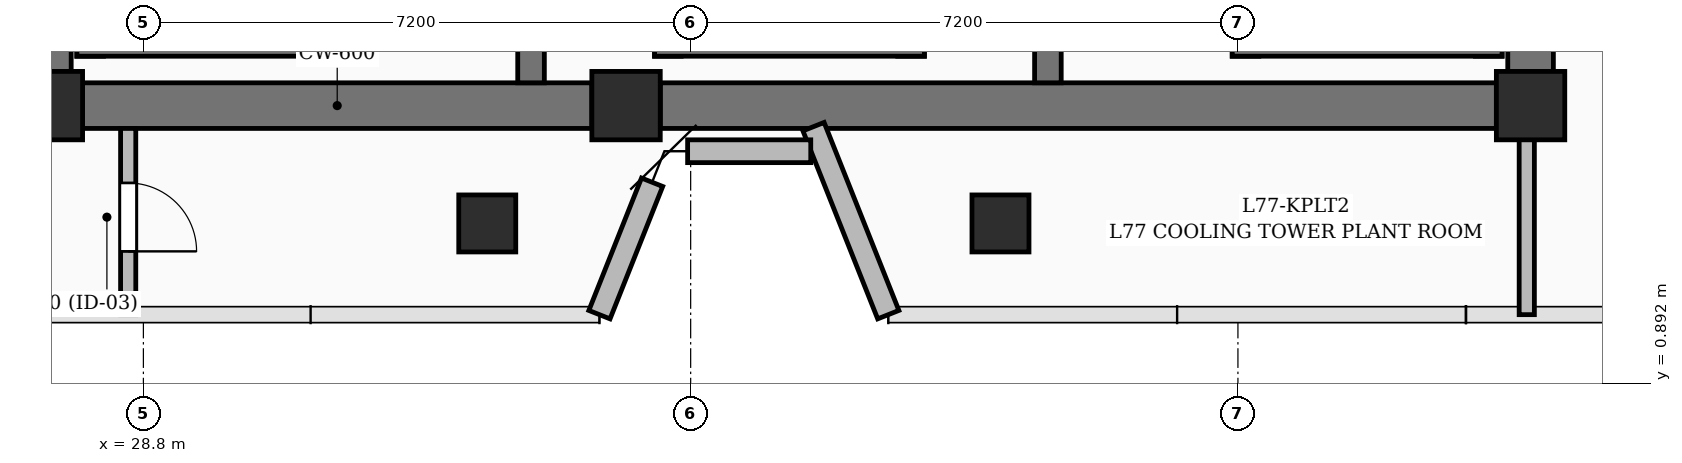
"""IFC4 building model, lengths in metres.
Left out: names, types, materials, properties, quantities, classifications, styles, units other than length and angle.
Written with IfcOpenShell. Run it as: python <this file> out.ifc"""

import sys

from ifc_helpers import new_model, si_unit, direction, frame, frame_2d, origin, origin_2d, place, context, subcontext, project, spatial, rectangle, extrude, element, fill, save


model = new_model("IFC4")
c1 = context("Model", 3, precision=1e-05, world=origin(), true_north=direction((0.0, 1.0)))
c2 = subcontext(c1, "Body", "Model", "MODEL_VIEW")
j1 = project(units=[si_unit("LENGTHUNIT", "METRE"), si_unit("PLANEANGLEUNIT", "RADIAN")], contexts=[c1])
p1 = place(None, origin())
s1 = spatial("IfcSite", under=j1, at=p1, CompositionType="ELEMENT")
p2 = place(p1, origin())
s2 = spatial("IfcBuilding", under=s1, at=p2, CompositionType="ELEMENT")
p3 = place(p2, frame((0.0, 0.0, 298.5)))
s3 = spatial("IfcBuildingStorey", under=s2, at=p3, CompositionType="ELEMENT", Elevation=298.5)
for number, where, z_axis, x_axis in (
    (1, (27.55, 4.55, 0.0), (0.0, 0.0, 1.0), (1.0, 0.0, 0.0)),
    (2, (35.15, 4.55, 0.0), (0.0, 0.0, 1.0), (1.0, 0.0, 0.0)),
    (3, (47.05, 4.55, 0.0), (0.0, 0.0, 1.0), (1.0, 0.0, 0.0)),
):
    element("IfcColumn", number, at=place(p3, frame(where, z_axis=z_axis, x_axis=x_axis)), inside=s3, PredefinedType="COLUMN", context=c2, shape_type="SweptSolid", body=[
        extrude(rectangle(XDim=0.9, YDim=0.9, at=origin_2d()), origin(), (0.0, 0.0, 1.0), 4.0),
    ])
p4 = place(p3, frame((28.0, 4.55, 0.0), z_axis=(0.0, 0.0, 1.0), x_axis=(1.0, 0.0, 0.0)))
e4 = element("IfcWall", 4, at=p4, inside=s3, PredefinedType="SHEAR", context=c2, shape_type="SweptSolid", body=[
    extrude(rectangle(XDim=6.7, YDim=0.6, at=frame_2d((3.35, 0.0))), origin(), (0.0, 0.0, 1.0), 4.0),
])
p5 = place(p3, frame((35.6, 4.55, 0.0), z_axis=(0.0, 0.0, 1.0), x_axis=(1.0, 0.0, 0.0)))
e5 = element("IfcWall", 5, at=p5, inside=s3, PredefinedType="SHEAR", context=c2, shape_type="SweptSolid", body=[
    extrude(rectangle(XDim=11.0, YDim=0.6, at=frame_2d((5.5, 0.0))), origin(), (0.0, 0.0, 1.0), 4.0),
])
for number, where, z_axis, x_axis in (
    (6, (27.55, 5.0, 0.0), (0.0, 0.0, 1.0), (0.0, 1.0, 0.0)),
    (7, (47.05, 5.0, 0.0), (0.0, 0.0, 1.0), (0.0, 1.0, 0.0)),
):
    element("IfcWall", number, at=place(p3, frame(where, z_axis=z_axis, x_axis=x_axis)), inside=s3, PredefinedType="SHEAR", context=c2, shape_type="SweptSolid", body=[
        extrude(rectangle(XDim=9.3, YDim=0.6, at=frame_2d((4.65, 0.0))), origin(), (0.0, 0.0, 1.0), 4.0),
    ])
p6 = place(p3, frame((28.1, 5.2, 0.0), z_axis=(0.0, 0.0, 1.0), x_axis=(0.0, 1.0, 0.0)))
e8 = element("IfcWall", 8, at=p6, inside=s3, PredefinedType="SOLIDWALL", context=c2, shape_type="SweptSolid", body=[
    extrude(rectangle(XDim=9.25, YDim=0.35, at=frame_2d((4.625, 0.0))), origin(), (0.0, 0.0, 1.0), 4.0),
])
p7 = place(p3, frame((31.3, 5.2, 0.0), z_axis=(0.0, 0.0, 1.0), x_axis=(0.0, 1.0, 0.0)))
e9 = element("IfcWall", 9, at=p7, inside=s3, PredefinedType="SOLIDWALL", context=c2, shape_type="SweptSolid", body=[
    extrude(rectangle(XDim=9.25, YDim=0.35, at=frame_2d((4.625, 0.0))), origin(), (0.0, 0.0, 1.0), 4.0),
])
p8 = place(p7, frame((6.95, 0.0, 0.0)))
e10 = element("IfcOpeningElement", 10, at=p8, cuts=e9, PredefinedType="OPENING", context=c2, shape_type="SweptSolid", body=[
    extrude(rectangle(XDim=1.0, YDim=2.15, at=frame_2d((0.5, 1.075))), frame((0.0, 0.185, 0.0), z_axis=(0.0, -1.0, 0.0), x_axis=(1.0, 0.0, 0.0)), (0.0, 0.0, 1.0), 0.37),
])
p9 = place(p3, frame((27.925, 5.375, 0.0), z_axis=(0.0, 0.0, 1.0), x_axis=(1.0, 0.0, 0.0)))
e11 = element("IfcWall", 11, at=p9, inside=s3, PredefinedType="SOLIDWALL", context=c2, shape_type="SweptSolid", body=[
    extrude(rectangle(XDim=3.55, YDim=0.35, at=frame_2d((1.775, 0.0))), origin(), (0.0, 0.0, 1.0), 4.0),
])
p10 = place(p3, frame((35.7, 5.2, 0.0), z_axis=(0.0, 0.0, 1.0), x_axis=(0.0, 1.0, 0.0)))
e12 = element("IfcWall", 12, at=p10, inside=s3, PredefinedType="SOLIDWALL", context=c2, shape_type="SweptSolid", body=[
    extrude(rectangle(XDim=9.25, YDim=0.35, at=frame_2d((4.625, 0.0))), origin(), (0.0, 0.0, 1.0), 4.0),
])
p11 = place(p10, frame((6.95, 0.0, 0.0)))
e13 = element("IfcOpeningElement", 13, at=p11, cuts=e12, PredefinedType="OPENING", context=c2, shape_type="SweptSolid", body=[
    extrude(rectangle(XDim=1.0, YDim=2.15, at=frame_2d((0.5, 1.075))), frame((0.0, 0.185, 0.0), z_axis=(0.0, -1.0, 0.0), x_axis=(1.0, 0.0, 0.0)), (0.0, 0.0, 1.0), 0.37),
])
p12 = place(p3, frame((38.9, 5.2, 0.0), z_axis=(0.0, 0.0, 1.0), x_axis=(0.0, 1.0, 0.0)))
e14 = element("IfcWall", 14, at=p12, inside=s3, PredefinedType="SOLIDWALL", context=c2, shape_type="SweptSolid", body=[
    extrude(rectangle(XDim=9.25, YDim=0.35, at=frame_2d((4.625, 0.0))), origin(), (0.0, 0.0, 1.0), 4.0),
])
p13 = place(p12, frame((6.95, 0.0, 0.0)))
e15 = element("IfcOpeningElement", 15, at=p13, cuts=e14, PredefinedType="OPENING", context=c2, shape_type="SweptSolid", body=[
    extrude(rectangle(XDim=1.0, YDim=2.15, at=frame_2d((0.5, 1.075))), frame((0.0, 0.185, 0.0), z_axis=(0.0, -1.0, 0.0), x_axis=(1.0, 0.0, 0.0)), (0.0, 0.0, 1.0), 0.37),
])
p14 = place(p3, frame((35.525, 5.375, 0.0), z_axis=(0.0, 0.0, 1.0), x_axis=(1.0, 0.0, 0.0)))
e16 = element("IfcWall", 16, at=p14, inside=s3, PredefinedType="SOLIDWALL", context=c2, shape_type="SweptSolid", body=[
    extrude(rectangle(XDim=3.55, YDim=0.35, at=frame_2d((1.775, 0.0))), origin(), (0.0, 0.0, 1.0), 4.0),
])
p15 = place(p3, frame((43.3, 5.2, 0.0), z_axis=(0.0, 0.0, 1.0), x_axis=(0.0, 1.0, 0.0)))
e17 = element("IfcWall", 17, at=p15, inside=s3, PredefinedType="SOLIDWALL", context=c2, shape_type="SweptSolid", body=[
    extrude(rectangle(XDim=9.25, YDim=0.35, at=frame_2d((4.625, 0.0))), origin(), (0.0, 0.0, 1.0), 4.0),
])
p16 = place(p15, frame((6.95, 0.0, 0.0)))
e18 = element("IfcOpeningElement", 18, at=p16, cuts=e17, PredefinedType="OPENING", context=c2, shape_type="SweptSolid", body=[
    extrude(rectangle(XDim=1.0, YDim=2.15, at=frame_2d((0.5, 1.075))), frame((0.0, 0.185, 0.0), z_axis=(0.0, -1.0, 0.0), x_axis=(1.0, 0.0, 0.0)), (0.0, 0.0, 1.0), 0.37),
])
p17 = place(p3, frame((46.5, 5.2, 0.0), z_axis=(0.0, 0.0, 1.0), x_axis=(0.0, 1.0, 0.0)))
e19 = element("IfcWall", 19, at=p17, inside=s3, PredefinedType="SOLIDWALL", context=c2, shape_type="SweptSolid", body=[
    extrude(rectangle(XDim=9.25, YDim=0.35, at=frame_2d((4.625, 0.0))), origin(), (0.0, 0.0, 1.0), 4.0),
])
p18 = place(p3, frame((43.125, 5.375, 0.0), z_axis=(0.0, 0.0, 1.0), x_axis=(1.0, 0.0, 0.0)))
e20 = element("IfcWall", 20, at=p18, inside=s3, PredefinedType="SOLIDWALL", context=c2, shape_type="SweptSolid", body=[
    extrude(rectangle(XDim=3.55, YDim=0.35, at=frame_2d((1.775, 0.0))), origin(), (0.0, 0.0, 1.0), 4.0),
])
for number, where, z_axis, x_axis in (
    (21, (33.9, 4.85, 0.0), (0.0, 0.0, 1.0), (0.0, 1.0, 0.0)),
    (22, (40.7, 4.85, 0.0), (0.0, 0.0, 1.0), (0.0, 1.0, 0.0)),
):
    element("IfcWall", number, at=place(p3, frame(where, z_axis=z_axis, x_axis=x_axis)), inside=s3, PredefinedType="SOLIDWALL", context=c2, shape_type="SweptSolid", body=[
        extrude(rectangle(XDim=3.075, YDim=0.35, at=frame_2d((1.538, 0.0))), origin(), (0.0, 0.0, 1.0), 4.0),
    ])
for number, where, z_axis, x_axis in (
    (23, (33.324, 3.0, 0.0), (0.0, 0.0, 1.0), (1.0, 0.0, 0.0)),
    (24, (40.076, 3.0, 0.0), (0.0, 0.0, 1.0), (1.0, 0.0, 0.0)),
):
    element("IfcColumn", number, at=place(p3, frame(where, z_axis=z_axis, x_axis=x_axis)), inside=s3, PredefinedType="COLUMN", context=c2, shape_type="SweptSolid", body=[
        extrude(rectangle(XDim=0.75, YDim=0.75, at=origin_2d()), origin(), (0.0, 0.0, 1.0), 4.0),
    ])
p19 = place(p3, frame((38.6, 1.8, 0.0), z_axis=(0.0, 0.0, 1.0), x_axis=(-0.369539725933, 0.929214932595, 0.0)))
e25 = element("IfcWall", 25, at=p19, inside=s3, PredefinedType="SOLIDWALL", context=c2, shape_type="SweptSolid", body=[
    extrude(rectangle(XDim=2.662, YDim=0.3, at=frame_2d((1.331, 0.0))), origin(), (0.0, 0.0, 1.0), 2.982),
])
p20 = place(p3, frame((37.58, 3.95, 0.0), z_axis=(0.0, 0.0, 1.0), x_axis=(-1.0, 0.0, 0.0)))
e26 = element("IfcWall", 26, at=p20, inside=s3, PredefinedType="SOLIDWALL", context=c2, shape_type="SweptSolid", body=[
    extrude(rectangle(XDim=1.62, YDim=0.3, at=frame_2d((0.81, 0.0))), origin(), (0.0, 0.0, 1.0), 3.04),
])
p21 = place(p3, frame((35.493, 3.542, 0.0), z_axis=(0.0, 0.0, 1.0), x_axis=(-0.369481251729, -0.929238185085, 0.0)))
e27 = element("IfcWall", 27, at=p21, inside=s3, PredefinedType="SOLIDWALL", context=c2, shape_type="SweptSolid", body=[
    extrude(rectangle(XDim=1.875, YDim=0.3, at=frame_2d((0.937, 0.0))), origin(), (0.0, 0.0, 1.0), 2.982),
])
p22 = place(p3, frame((28.6, 4.25, 0.0), z_axis=(0.0, 0.0, 1.0), x_axis=(0.0, -1.0, 0.0)))
e28 = element("IfcWall", 28, at=p22, inside=s3, PredefinedType="PARTITIONING", context=c2, shape_type="SweptSolid", body=[
    extrude(rectangle(XDim=2.45, YDim=0.2, at=frame_2d((1.225, 0.0))), origin(), (0.0, 0.0, 1.0), 2.977),
])
p23 = place(p22, frame((0.717, 0.0, 0.0)))
e29 = element("IfcOpeningElement", 29, at=p23, cuts=e28, PredefinedType="OPENING", context=c2, shape_type="SweptSolid", body=[
    extrude(rectangle(XDim=0.9, YDim=2.1, at=frame_2d((0.45, 1.05))), frame((0.0, 0.11, 0.0), z_axis=(0.0, -1.0, 0.0), x_axis=(1.0, 0.0, 0.0)), (0.0, 0.0, 1.0), 0.22),
])
p24 = place(p3, frame((47.0, 1.8, 0.0), z_axis=(0.0, 0.0, 1.0), x_axis=(0.0, 1.0, 0.0)))
e30 = element("IfcWall", 30, at=p24, inside=s3, PredefinedType="PARTITIONING", context=c2, shape_type="SweptSolid", body=[
    extrude(rectangle(XDim=2.45, YDim=0.2, at=frame_2d((1.225, 0.0))), origin(), (0.0, 0.0, 1.0), 2.977),
])
p25 = place(p23, origin())
e31 = element("IfcDoor", 31, at=p25, inside=s3, OperationType="SINGLE_SWING_RIGHT", PredefinedType="DOOR", context=c2, shape_type="SweptSolid", body=[
    extrude(rectangle(XDim=0.9, YDim=2.1, at=frame_2d((0.45, 1.05))), frame((0.0, 0.025, 0.0), z_axis=(0.0, -1.0, 0.0), x_axis=(1.0, 0.0, 0.0)), (0.0, 0.0, 1.0), 0.05),
])
fill(e29, e31)
save(model, sys.argv[1])
